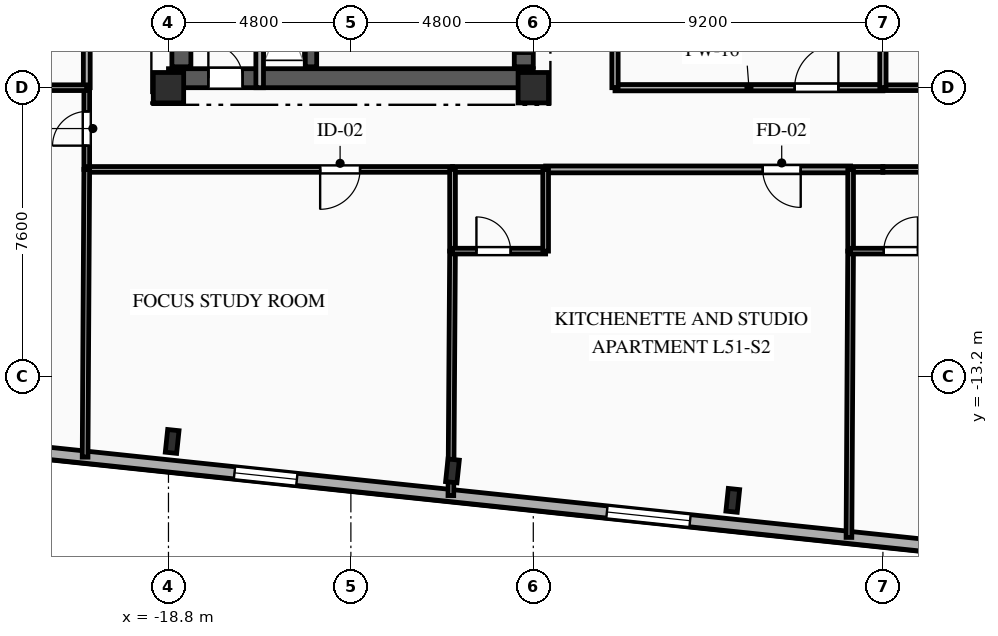
"""IFC4 building model, lengths in metres.
Left out: names, types, materials, properties, quantities, classifications, styles, units other than length and angle.
Written with IfcOpenShell. Run it as: python <this file> out.ifc"""

import sys

from ifc_helpers import new_model, si_unit, direction, frame, frame_2d, origin, origin_2d, place, context, subcontext, project, spatial, rectangle, i_section, extrude, element, fill, save


model = new_model("IFC4")
c1 = context("Model", 3, precision=1e-05, world=origin(), true_north=direction((0.0, 1.0)))
c2 = subcontext(c1, "Body", "Model", "MODEL_VIEW")
j1 = project(units=[si_unit("LENGTHUNIT", "METRE"), si_unit("PLANEANGLEUNIT", "RADIAN")], contexts=[c1])
p1 = place(None, origin())
s1 = spatial("IfcSite", under=j1, at=p1, CompositionType="ELEMENT")
p2 = place(p1, origin())
s2 = spatial("IfcBuilding", under=s1, at=p2, CompositionType="ELEMENT")
p3 = place(p2, frame((0.0, 0.0, 183.0)))
s3 = spatial("IfcBuildingStorey", under=s2, at=p3, CompositionType="ELEMENT", Elevation=183.0)
for number, where, z_axis, x_axis in (
    (1, (-18.8, -5.6, 0.0), (0.0, 0.0, 1.0), (1.0, 0.0, 0.0)),
    (2, (-9.2, -5.6, 0.0), (0.0, 0.0, 1.0), (1.0, 0.0, 0.0)),
):
    element("IfcColumn", number, at=place(p3, frame(where, z_axis=z_axis, x_axis=x_axis)), inside=s3, PredefinedType="COLUMN", context=c2, shape_type="SweptSolid", body=[
        extrude(rectangle(XDim=0.8, YDim=0.8, at=origin_2d()), origin(), (0.0, 0.0, 1.0), 3.35),
    ])
for number, where, z_axis, x_axis in (
    (3, (-18.703, -14.908, 0.0), (0.0, 0.0, 1.0), (0.995, -0.105, 0.0)),
    (4, (-11.327, -15.683, 0.0), (0.0, 0.0, 1.0), (0.995, -0.105, 0.0)),
    (5, (-3.951, -16.458, 0.0), (0.0, 0.0, 1.0), (0.995, -0.105, 0.0)),
):
    element("IfcColumn", number, at=place(p3, frame(where, z_axis=z_axis, x_axis=x_axis)), inside=s3, PredefinedType="COLUMN", context=c2, shape_type="SweptSolid", body=[
        extrude(i_section(OverallWidth=0.3, OverallDepth=0.6, WebThickness=0.015, FlangeThickness=0.03, FilletRadius=0.027, at=origin_2d()), origin(), (0.0, 0.0, 1.0), 3.35),
    ])
p4 = place(p3, frame((18.756, -19.498, 0.0), z_axis=(0.0, 0.0, 1.0), x_axis=(-0.994522060044, 0.104526896475, 0.0)))
e6 = element("IfcWall", 6, at=p4, inside=s3, PredefinedType="SOLIDWALL", context=c2, shape_type="SweptSolid", body=[
    extrude(rectangle(XDim=45.8, YDim=0.32, at=frame_2d((22.9, 0.0))), origin(), (0.0, 0.0, 1.0), 3.04),
])
p5 = place(p4, frame((1.217, 0.0, 0.85)))
e7 = element("IfcOpeningElement", 7, at=p5, cuts=e6, PredefinedType="OPENING", context=c2, shape_type="SweptSolid", body=[
    extrude(rectangle(XDim=1.65, YDim=1.85, at=frame_2d((0.825, 0.925))), frame((0.0, 0.17, 0.0), z_axis=(0.0, -1.0, 0.0), x_axis=(1.0, 0.0, 0.0)), (0.0, 0.0, 1.0), 0.34),
])
p6 = place(p4, frame((5.621, 0.0, 0.85)))
e8 = element("IfcOpeningElement", 8, at=p6, cuts=e6, PredefinedType="OPENING", context=c2, shape_type="SweptSolid", body=[
    extrude(rectangle(XDim=1.65, YDim=1.85, at=frame_2d((0.825, 0.925))), frame((0.0, 0.17, 0.0), z_axis=(0.0, -1.0, 0.0), x_axis=(1.0, 0.0, 0.0)), (0.0, 0.0, 1.0), 0.34),
])
p7 = place(p4, frame((13.433, 0.0, 0.85)))
e9 = element("IfcOpeningElement", 9, at=p7, cuts=e6, PredefinedType="OPENING", context=c2, shape_type="SweptSolid", body=[
    extrude(rectangle(XDim=2.2, YDim=1.85, at=frame_2d((1.1, 0.925))), frame((0.0, 0.17, 0.0), z_axis=(0.0, -1.0, 0.0), x_axis=(1.0, 0.0, 0.0)), (0.0, 0.0, 1.0), 0.34),
])
p8 = place(p4, frame((23.962, 0.0, 0.85)))
e10 = element("IfcOpeningElement", 10, at=p8, cuts=e6, PredefinedType="OPENING", context=c2, shape_type="SweptSolid", body=[
    extrude(rectangle(XDim=2.2, YDim=1.85, at=frame_2d((1.1, 0.925))), frame((0.0, 0.17, 0.0), z_axis=(0.0, -1.0, 0.0), x_axis=(1.0, 0.0, 0.0)), (0.0, 0.0, 1.0), 0.34),
])
p9 = place(p4, frame((34.366, 0.0, 0.85)))
e11 = element("IfcOpeningElement", 11, at=p9, cuts=e6, PredefinedType="OPENING", context=c2, shape_type="SweptSolid", body=[
    extrude(rectangle(XDim=1.65, YDim=1.85, at=frame_2d((0.825, 0.925))), frame((0.0, 0.17, 0.0), z_axis=(0.0, -1.0, 0.0), x_axis=(1.0, 0.0, 0.0)), (0.0, 0.0, 1.0), 0.34),
])
p10 = place(p4, frame((41.892, 0.0, 0.85)))
e12 = element("IfcOpeningElement", 12, at=p10, cuts=e6, PredefinedType="OPENING", context=c2, shape_type="SweptSolid", body=[
    extrude(rectangle(XDim=1.65, YDim=1.85, at=frame_2d((0.825, 0.925))), frame((0.0, 0.17, 0.0), z_axis=(0.0, -1.0, 0.0), x_axis=(1.0, 0.0, 0.0)), (0.0, 0.0, 1.0), 0.34),
])
p11 = place(p3, frame((-18.8, -5.35, 0.0), z_axis=(0.0, 0.0, 1.0), x_axis=(1.0, 0.0, 0.0)))
e13 = element("IfcWall", 13, at=p11, inside=s3, PredefinedType="SHEAR", context=c2, shape_type="SweptSolid", body=[
    extrude(rectangle(XDim=9.6, YDim=0.5, at=frame_2d((4.8, 0.0))), origin(), (0.0, 0.0, 1.0), 3.04),
])
p12 = place(p11, frame((1.05, 0.0, 0.0)))
e14 = element("IfcOpeningElement", 14, at=p12, cuts=e13, PredefinedType="OPENING", context=c2, shape_type="SweptSolid", body=[
    extrude(rectangle(XDim=0.9, YDim=2.1, at=frame_2d((0.45, 1.05))), frame((0.0, 0.26, 0.0), z_axis=(0.0, -1.0, 0.0), x_axis=(1.0, 0.0, 0.0)), (0.0, 0.0, 1.0), 0.52),
])
p13 = place(p3, frame((-18.46, -5.05, 0.0), z_axis=(0.0, 0.0, 1.0), x_axis=(0.0, 1.0, 0.0)))
e15 = element("IfcWall", 15, at=p13, inside=s3, PredefinedType="SHEAR", context=c2, shape_type="SweptSolid", body=[
    extrude(rectangle(XDim=10.1, YDim=0.5, at=frame_2d((5.05, 0.0))), origin(), (0.0, 0.0, 1.0), 3.04),
])
p14 = place(p3, frame((-9.45, -5.05, 0.0), z_axis=(0.0, 0.0, 1.0), x_axis=(0.0, 1.0, 0.0)))
e16 = element("IfcWall", 16, at=p14, inside=s3, PredefinedType="SHEAR", context=c2, shape_type="SweptSolid", body=[
    extrude(rectangle(XDim=10.1, YDim=0.5, at=frame_2d((5.05, 0.0))), origin(), (0.0, 0.0, 1.0), 3.04),
])
p15 = place(p14, frame((7.15, 0.0, 0.0)))
e17 = element("IfcOpeningElement", 17, at=p15, cuts=e16, PredefinedType="OPENING", context=c2, shape_type="SweptSolid", body=[
    extrude(rectangle(XDim=0.9, YDim=2.1, at=frame_2d((0.45, 1.05))), frame((0.0, 0.26, 0.0), z_axis=(0.0, -1.0, 0.0), x_axis=(1.0, 0.0, 0.0)), (0.0, 0.0, 1.0), 0.52),
])
p16 = place(p14, frame((2.4, 0.0, 0.0)))
e18 = element("IfcOpeningElement", 18, at=p16, cuts=e16, PredefinedType="OPENING", context=c2, shape_type="SweptSolid", body=[
    extrude(rectangle(XDim=1.2, YDim=2.15, at=frame_2d((0.6, 1.075))), frame((0.0, 0.26, 0.0), z_axis=(0.0, -1.0, 0.0), x_axis=(1.0, 0.0, 0.0)), (0.0, 0.0, 1.0), 0.52),
])
p17 = place(p14, frame((0.35, 0.0, 0.0)))
e19 = element("IfcOpeningElement", 19, at=p17, cuts=e16, PredefinedType="OPENING", context=c2, shape_type="SweptSolid", body=[
    extrude(rectangle(XDim=0.9, YDim=2.1, at=frame_2d((0.45, 1.05))), frame((0.0, 0.26, 0.0), z_axis=(0.0, -1.0, 0.0), x_axis=(1.0, 0.0, 0.0)), (0.0, 0.0, 1.0), 0.52),
])
p18 = place(p14, frame((5.0, 0.0, 0.0)))
e20 = element("IfcOpeningElement", 20, at=p18, cuts=e16, PredefinedType="OPENING", context=c2, shape_type="SweptSolid", body=[
    extrude(rectangle(XDim=0.9, YDim=2.1, at=frame_2d((0.45, 1.05))), frame((0.0, 0.26, 0.0), z_axis=(0.0, -1.0, 0.0), x_axis=(1.0, 0.0, 0.0)), (0.0, 0.0, 1.0), 0.52),
])
p19 = place(p3, frame((-15.05, -5.05, 0.0), z_axis=(0.0, 0.0, 1.0), x_axis=(0.0, 1.0, 0.0)))
e21 = element("IfcWall", 21, at=p19, inside=s3, PredefinedType="SHEAR", context=c2, shape_type="SweptSolid", body=[
    extrude(rectangle(XDim=10.1, YDim=0.3, at=frame_2d((5.05, 0.0))), origin(), (0.0, 0.0, 1.0), 3.04),
])
p20 = place(p3, frame((-16.4, -5.6, 0.0), z_axis=(0.0, 0.0, 1.0), x_axis=(0.0, 1.0, 0.0)))
e22 = element("IfcWall", 22, at=p20, inside=s3, PredefinedType="PARTITIONING", context=c2, shape_type="SweptSolid", body=[
    extrude(rectangle(XDim=3.49, YDim=0.2, at=frame_2d((1.745, 0.0))), origin(), (0.0, 0.0, 1.0), 3.04),
])
p21 = place(p3, frame((-20.95, -7.75, 0.0), z_axis=(0.0, 0.0, 1.0), x_axis=(0.0, 1.0, 0.0)))
e23 = element("IfcWall", 23, at=p21, inside=s3, PredefinedType="PARTITIONING", context=c2, shape_type="SweptSolid", body=[
    extrude(rectangle(XDim=2.15, YDim=0.15, at=frame_2d((1.075, 0.0))), origin(), (0.0, 0.0, 1.0), 3.04),
])
p22 = place(p21, frame((0.625, 0.0, 0.0)))
e24 = element("IfcOpeningElement", 24, at=p22, cuts=e23, PredefinedType="OPENING", context=c2, shape_type="SweptSolid", body=[
    extrude(rectangle(XDim=0.9, YDim=2.1, at=frame_2d((0.45, 1.05))), frame((0.0, 0.085, 0.0), z_axis=(0.0, -1.0, 0.0), x_axis=(1.0, 0.0, 0.0)), (0.0, 0.0, 1.0), 0.17),
])
p23 = place(p3, frame((-11.325, -7.75, 0.0), z_axis=(0.0, 0.0, 1.0), x_axis=(-1.0, 0.0, 0.0)))
e25 = element("IfcWall", 25, at=p23, inside=s3, PredefinedType="PARTITIONING", context=c2, shape_type="SweptSolid", body=[
    extrude(rectangle(XDim=9.625, YDim=0.15, at=frame_2d((4.812, 0.0))), origin(), (0.0, 0.0, 1.0), 3.04),
])
p24 = place(p23, frame((2.434, 0.0, 0.0)))
e26 = element("IfcOpeningElement", 26, at=p24, cuts=e25, PredefinedType="OPENING", context=c2, shape_type="SweptSolid", body=[
    extrude(rectangle(XDim=1.05, YDim=2.15, at=frame_2d((0.525, 1.075))), frame((0.0, 0.085, 0.0), z_axis=(0.0, -1.0, 0.0), x_axis=(1.0, 0.0, 0.0)), (0.0, 0.0, 1.0), 0.17),
])
p25 = place(p3, frame((-0.85, -7.75, 0.0), z_axis=(0.0, 0.0, 1.0), x_axis=(-1.0, 0.0, 0.0)))
e27 = element("IfcWall", 27, at=p25, inside=s3, PredefinedType="PARTITIONING", context=c2, shape_type="SweptSolid", body=[
    extrude(rectangle(XDim=8.025, YDim=0.18, at=frame_2d((4.012, 0.0))), origin(), (0.0, 0.0, 1.0), 3.04),
])
p26 = place(p25, frame((1.313, 0.0, 0.0)))
e28 = element("IfcOpeningElement", 28, at=p26, cuts=e27, PredefinedType="OPENING", context=c2, shape_type="SweptSolid", body=[
    extrude(rectangle(XDim=1.0, YDim=2.15, at=frame_2d((0.5, 1.075))), frame((0.0, 0.1, 0.0), z_axis=(0.0, -1.0, 0.0), x_axis=(1.0, 0.0, 0.0)), (0.0, 0.0, 1.0), 0.2),
])
p27 = place(p3, frame((-8.875, -7.75, 0.0), z_axis=(0.0, 0.0, 1.0), x_axis=(-1.0, 0.0, 0.0)))
e29 = element("IfcWall", 29, at=p27, inside=s3, PredefinedType="PLUMBINGWALL", context=c2, shape_type="SweptSolid", body=[
    extrude(rectangle(XDim=2.45, YDim=0.15, at=frame_2d((1.225, 0.0))), origin(), (0.0, 0.0, 1.0), 3.04),
])
p28 = place(p3, frame((0.0, -7.75, 0.0), z_axis=(0.0, 0.0, 1.0), x_axis=(-1.0, 0.0, 0.0)))
e30 = element("IfcWall", 30, at=p28, inside=s3, PredefinedType="PLUMBINGWALL", context=c2, shape_type="SweptSolid", body=[
    extrude(rectangle(XDim=0.85, YDim=0.15, at=frame_2d((0.425, 0.0))), origin(), (0.0, 0.0, 1.0), 3.04),
])
p29 = place(p3, frame((-7.05, -5.6, 0.0), z_axis=(0.0, 0.0, 1.0), x_axis=(1.0, 0.0, 0.0)))
e31 = element("IfcWall", 31, at=p29, inside=s3, PredefinedType="PARTITIONING", context=c2, shape_type="SweptSolid", body=[
    extrude(rectangle(XDim=7.05, YDim=0.165, at=frame_2d((3.525, 0.0))), origin(), (0.0, 0.0, 1.0), 2.525),
])
p30 = place(p29, frame((4.728, 0.0, 0.0)))
e32 = element("IfcOpeningElement", 32, at=p30, cuts=e31, PredefinedType="OPENING", context=c2, shape_type="SweptSolid", body=[
    extrude(rectangle(XDim=1.15, YDim=2.15, at=frame_2d((0.575, 1.075))), frame((0.0, 0.093, 0.0), z_axis=(0.0, -1.0, 0.0), x_axis=(1.0, 0.0, 0.0)), (0.0, 0.0, 1.0), 0.185),
])
p31 = place(p3, frame((1.6, -7.75, 0.0), z_axis=(0.0, 0.0, 1.0), x_axis=(-1.0, 0.0, 0.0)))
e33 = element("IfcWall", 33, at=p31, inside=s3, PredefinedType="PLUMBINGWALL", context=c2, shape_type="SweptSolid", body=[
    extrude(rectangle(XDim=1.6, YDim=0.15, at=frame_2d((0.8, 0.0))), origin(), (0.0, 0.0, 1.0), 3.04),
])
p32 = place(p3, frame((0.0, -5.6, 0.0), z_axis=(0.0, 0.0, 1.0), x_axis=(1.0, 0.0, 0.0)))
e34 = element("IfcWall", 34, at=p32, inside=s3, PredefinedType="PARTITIONING", context=c2, shape_type="SweptSolid", body=[
    extrude(rectangle(XDim=7.05, YDim=0.15, at=frame_2d((3.525, 0.0))), origin(), (0.0, 0.0, 1.0), 2.525),
])
p33 = place(p32, frame((1.185, 0.0, 0.0)))
e35 = element("IfcOpeningElement", 35, at=p33, cuts=e34, PredefinedType="OPENING", context=c2, shape_type="SweptSolid", body=[
    extrude(rectangle(XDim=1.05, YDim=2.15, at=frame_2d((0.525, 1.075))), frame((0.0, 0.085, 0.0), z_axis=(0.0, -1.0, 0.0), x_axis=(1.0, 0.0, 0.0)), (0.0, 0.0, 1.0), 0.17),
])
p34 = place(p3, frame((-20.95, -5.6, 0.0), z_axis=(0.0, 0.0, 1.0), x_axis=(0.0, 1.0, 0.0)))
e36 = element("IfcWall", 36, at=p34, inside=s3, PredefinedType="PARTITIONING", context=c2, shape_type="SweptSolid", body=[
    extrude(rectangle(XDim=14.1, YDim=0.18, at=frame_2d((7.05, 0.0))), origin(), (0.0, 0.0, 1.0), 3.04),
])
p35 = place(p34, frame((5.058, 0.0, 0.0)))
e37 = element("IfcOpeningElement", 37, at=p35, cuts=e36, PredefinedType="OPENING", context=c2, shape_type="SweptSolid", body=[
    extrude(rectangle(XDim=1.0, YDim=2.15, at=frame_2d((0.5, 1.075))), frame((0.0, 0.1, 0.0), z_axis=(0.0, -1.0, 0.0), x_axis=(1.0, 0.0, 0.0)), (0.0, 0.0, 1.0), 0.2),
])
p36 = place(p3, frame((-7.05, -2.95, 0.0), z_axis=(0.0, 0.0, 1.0), x_axis=(0.0, -1.0, 0.0)))
e38 = element("IfcWall", 38, at=p36, inside=s3, PredefinedType="PARTITIONING", context=c2, shape_type="SweptSolid", body=[
    extrude(rectangle(XDim=2.65, YDim=0.165, at=frame_2d((1.325, 0.0))), origin(), (0.0, 0.0, 1.0), 3.04),
])
p37 = place(p3, frame((-20.95, -5.6, 0.0), z_axis=(0.0, 0.0, 1.0), x_axis=(-1.0, 0.0, 0.0)))
e39 = element("IfcWall", 39, at=p37, inside=s3, PredefinedType="PARTITIONING", context=c2, shape_type="SweptSolid", body=[
    extrude(rectangle(XDim=2.65, YDim=0.15, at=frame_2d((1.325, 0.0))), origin(), (0.0, 0.0, 1.0), 3.04),
])
p38 = place(p37, frame((0.965, 0.0, 0.0)))
e40 = element("IfcOpeningElement", 40, at=p38, cuts=e39, PredefinedType="OPENING", context=c2, shape_type="SweptSolid", body=[
    extrude(rectangle(XDim=1.05, YDim=2.15, at=frame_2d((0.525, 1.075))), frame((0.0, 0.085, 0.0), z_axis=(0.0, -1.0, 0.0), x_axis=(1.0, 0.0, 0.0)), (0.0, 0.0, 1.0), 0.17),
])
p39 = place(p3, frame((-20.95, -7.75, 0.0), z_axis=(0.0, 0.0, 1.0), x_axis=(-0.005804668564, -0.99998315277, 0.0)))
e41 = element("IfcWall", 41, at=p39, inside=s3, PredefinedType="PARTITIONING", context=c2, shape_type="SweptSolid", body=[
    extrude(rectangle(XDim=7.571, YDim=0.15, at=frame_2d((3.785, 0.0))), origin(), (0.0, 0.0, 1.0), 3.04),
])
p40 = place(p3, frame((-11.325, -9.9, 0.0), z_axis=(0.0, 0.0, 1.0), x_axis=(-0.006831737937, -0.999976663406, 0.0)))
e42 = element("IfcWall", 42, at=p40, inside=s3, PredefinedType="PARTITIONING", context=c2, shape_type="SweptSolid", body=[
    extrude(rectangle(XDim=6.433, YDim=0.15, at=frame_2d((3.216, 0.0))), origin(), (0.0, 0.0, 1.0), 2.665),
])
p41 = place(p3, frame((-11.325, -7.75, 0.0), z_axis=(0.0, 0.0, 1.0), x_axis=(0.0, -1.0, 0.0)))
e43 = element("IfcWall", 43, at=p41, inside=s3, PredefinedType="PLUMBINGWALL", context=c2, shape_type="SweptSolid", body=[
    extrude(rectangle(XDim=2.15, YDim=0.15, at=frame_2d((1.075, 0.0))), origin(), (0.0, 0.0, 1.0), 3.04),
])
p42 = place(p3, frame((-11.325, -9.9, 0.0), z_axis=(0.0, 0.0, 1.0), x_axis=(1.0, 0.0, 0.0)))
e44 = element("IfcWall", 44, at=p42, inside=s3, PredefinedType="PLUMBINGWALL", context=c2, shape_type="SweptSolid", body=[
    extrude(rectangle(XDim=2.45, YDim=0.15, at=frame_2d((1.225, 0.0))), origin(), (0.0, 0.0, 1.0), 3.04),
])
p43 = place(p42, frame((0.629, 0.0, 0.0)))
e45 = element("IfcOpeningElement", 45, at=p43, cuts=e44, PredefinedType="OPENING", context=c2, shape_type="SweptSolid", body=[
    extrude(rectangle(XDim=0.9, YDim=2.1, at=frame_2d((0.45, 1.05))), frame((0.0, 0.085, 0.0), z_axis=(0.0, -1.0, 0.0), x_axis=(1.0, 0.0, 0.0)), (0.0, 0.0, 1.0), 0.17),
])
p44 = place(p3, frame((-8.875, -9.9, 0.0), z_axis=(0.0, 0.0, 1.0), x_axis=(0.0, 1.0, 0.0)))
e46 = element("IfcWall", 46, at=p44, inside=s3, PredefinedType="PLUMBINGWALL", context=c2, shape_type="SweptSolid", body=[
    extrude(rectangle(XDim=2.15, YDim=0.15, at=frame_2d((1.075, 0.0))), origin(), (0.0, 0.0, 1.0), 3.04),
])
p45 = place(p3, frame((-0.85, -9.9, 0.0), z_axis=(0.0, 0.0, 1.0), x_axis=(-0.005801043172, -0.999983173807, 0.0)))
e47 = element("IfcWall", 47, at=p45, inside=s3, PredefinedType="PARTITIONING", context=c2, shape_type="SweptSolid", body=[
    extrude(rectangle(XDim=7.533, YDim=0.15, at=frame_2d((3.767, 0.0))), origin(), (0.0, 0.0, 1.0), 3.04),
])
p46 = place(p3, frame((-0.85, -7.75, 0.0), z_axis=(0.0, 0.0, 1.0), x_axis=(0.0, -1.0, 0.0)))
e48 = element("IfcWall", 48, at=p46, inside=s3, PredefinedType="PLUMBINGWALL", context=c2, shape_type="SweptSolid", body=[
    extrude(rectangle(XDim=2.15, YDim=0.15, at=frame_2d((1.075, 0.0))), origin(), (0.0, 0.0, 1.0), 3.04),
])
p47 = place(p3, frame((-0.85, -9.9, 0.0), z_axis=(0.0, 0.0, 1.0), x_axis=(1.0, 0.0, 0.0)))
e49 = element("IfcWall", 49, at=p47, inside=s3, PredefinedType="PLUMBINGWALL", context=c2, shape_type="SweptSolid", body=[
    extrude(rectangle(XDim=2.45, YDim=0.15, at=frame_2d((1.225, 0.0))), origin(), (0.0, 0.0, 1.0), 3.04),
])
p48 = place(p47, frame((0.873, 0.0, 0.0)))
e50 = element("IfcOpeningElement", 50, at=p48, cuts=e49, PredefinedType="OPENING", context=c2, shape_type="SweptSolid", body=[
    extrude(rectangle(XDim=0.9, YDim=2.1, at=frame_2d((0.45, 1.05))), frame((0.0, 0.085, 0.0), z_axis=(0.0, -1.0, 0.0), x_axis=(1.0, 0.0, 0.0)), (0.0, 0.0, 1.0), 0.17),
])
p49 = place(p3, frame((0.0, -2.95, 0.0), z_axis=(0.0, 0.0, 1.0), x_axis=(0.0, -1.0, 0.0)))
e51 = element("IfcWall", 51, at=p49, inside=s3, PredefinedType="PARTITIONING", context=c2, shape_type="SweptSolid", body=[
    extrude(rectangle(XDim=2.65, YDim=0.165, at=frame_2d((1.325, 0.0))), origin(), (0.0, 0.0, 1.0), 3.04),
])
p50 = place(p8, origin())
e52 = element("IfcWindow", 52, at=p50, inside=s3, PartitioningType="SINGLE_PANEL", PredefinedType="WINDOW", context=c2, shape_type="SweptSolid", body=[
    extrude(rectangle(XDim=2.2, YDim=1.85, at=frame_2d((1.1, 0.925))), frame((0.0, 0.03, 0.0), z_axis=(0.0, -1.0, 0.0), x_axis=(1.0, 0.0, 0.0)), (0.0, 0.0, 1.0), 0.06),
])
fill(e10, e52)
p51 = place(p9, origin())
e53 = element("IfcWindow", 53, at=p51, inside=s3, PartitioningType="SINGLE_PANEL", PredefinedType="WINDOW", context=c2, shape_type="SweptSolid", body=[
    extrude(rectangle(XDim=1.65, YDim=1.85, at=frame_2d((0.825, 0.925))), frame((0.0, 0.03, 0.0), z_axis=(0.0, -1.0, 0.0), x_axis=(1.0, 0.0, 0.0)), (0.0, 0.0, 1.0), 0.06),
])
fill(e11, e53)
p52 = place(p12, origin())
e54 = element("IfcDoor", 54, at=p52, inside=s3, OperationType="SINGLE_SWING_LEFT", PredefinedType="DOOR", context=c2, shape_type="SweptSolid", body=[
    extrude(rectangle(XDim=0.9, YDim=2.1, at=frame_2d((0.45, 1.05))), frame((0.0, 0.025, 0.0), z_axis=(0.0, -1.0, 0.0), x_axis=(1.0, 0.0, 0.0)), (0.0, 0.0, 1.0), 0.05),
])
fill(e14, e54)
p53 = place(p17, origin())
e55 = element("IfcDoor", 55, at=p53, inside=s3, OperationType="SINGLE_SWING_RIGHT", PredefinedType="DOOR", context=c2, shape_type="SweptSolid", body=[
    extrude(rectangle(XDim=0.9, YDim=2.1, at=frame_2d((0.45, 1.05))), frame((0.0, 0.025, 0.0), z_axis=(0.0, -1.0, 0.0), x_axis=(1.0, 0.0, 0.0)), (0.0, 0.0, 1.0), 0.05),
])
fill(e19, e55)
p54 = place(p22, origin())
e56 = element("IfcDoor", 56, at=p54, inside=s3, OperationType="SINGLE_SWING_LEFT", PredefinedType="DOOR", context=c2, shape_type="SweptSolid", body=[
    extrude(rectangle(XDim=0.9, YDim=2.1, at=frame_2d((0.45, 1.05))), frame((0.0, 0.025, 0.0), z_axis=(0.0, -1.0, 0.0), x_axis=(1.0, 0.0, 0.0)), (0.0, 0.0, 1.0), 0.05),
])
fill(e24, e56)
p55 = place(p24, origin())
e57 = element("IfcDoor", 57, at=p55, inside=s3, OperationType="SINGLE_SWING_RIGHT", PredefinedType="DOOR", context=c2, shape_type="SweptSolid", body=[
    extrude(rectangle(XDim=1.05, YDim=2.15, at=frame_2d((0.525, 1.075))), frame((0.0, 0.025, 0.0), z_axis=(0.0, -1.0, 0.0), x_axis=(1.0, 0.0, 0.0)), (0.0, 0.0, 1.0), 0.05),
])
fill(e26, e57)
p56 = place(p26, origin())
e58 = element("IfcDoor", 58, at=p56, inside=s3, OperationType="SINGLE_SWING_LEFT", PredefinedType="DOOR", context=c2, shape_type="SweptSolid", body=[
    extrude(rectangle(XDim=1.0, YDim=2.15, at=frame_2d((0.5, 1.075))), frame((0.0, 0.025, 0.0), z_axis=(0.0, -1.0, 0.0), x_axis=(1.0, 0.0, 0.0)), (0.0, 0.0, 1.0), 0.05),
])
fill(e28, e58)
p57 = place(p30, origin())
e59 = element("IfcDoor", 59, at=p57, inside=s3, OperationType="SINGLE_SWING_RIGHT", PredefinedType="DOOR", context=c2, shape_type="SweptSolid", body=[
    extrude(rectangle(XDim=1.15, YDim=2.15, at=frame_2d((0.575, 1.075))), frame((0.0, 0.025, 0.0), z_axis=(0.0, -1.0, 0.0), x_axis=(1.0, 0.0, 0.0)), (0.0, 0.0, 1.0), 0.05),
])
fill(e32, e59)
p58 = place(p43, origin())
e60 = element("IfcDoor", 60, at=p58, inside=s3, OperationType="SINGLE_SWING_LEFT", PredefinedType="DOOR", context=c2, shape_type="SweptSolid", body=[
    extrude(rectangle(XDim=0.9, YDim=2.1, at=frame_2d((0.45, 1.05))), frame((0.0, 0.025, 0.0), z_axis=(0.0, -1.0, 0.0), x_axis=(1.0, 0.0, 0.0)), (0.0, 0.0, 1.0), 0.05),
])
fill(e45, e60)
p59 = place(p48, origin())
e61 = element("IfcDoor", 61, at=p59, inside=s3, OperationType="SINGLE_SWING_RIGHT", PredefinedType="DOOR", context=c2, shape_type="SweptSolid", body=[
    extrude(rectangle(XDim=0.9, YDim=2.1, at=frame_2d((0.45, 1.05))), frame((0.0, 0.025, 0.0), z_axis=(0.0, -1.0, 0.0), x_axis=(1.0, 0.0, 0.0)), (0.0, 0.0, 1.0), 0.05),
])
fill(e50, e61)
save(model, sys.argv[1])
